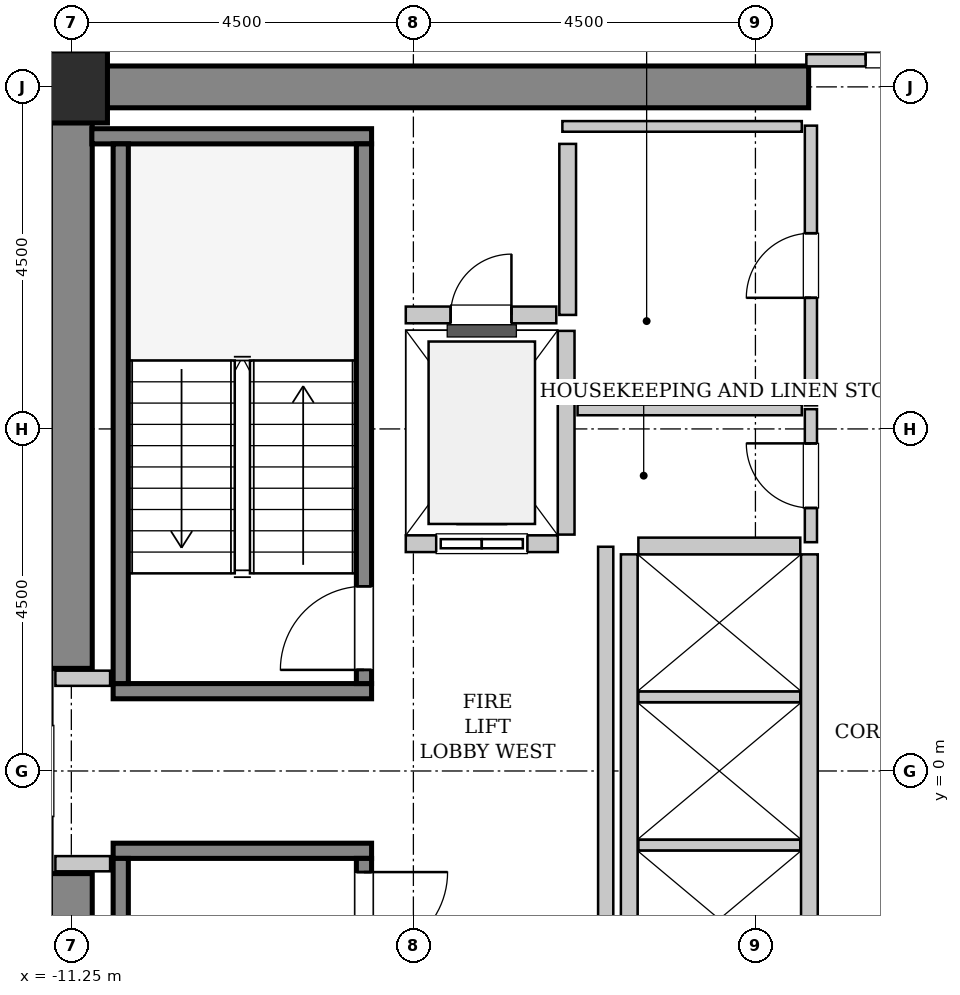
"""IFC4 building model, lengths in metres.
Left out: names, types, materials, properties, quantities, classifications, styles, units other than length and angle.
Written with IfcOpenShell. Run it as: python <this file> out.ifc"""

import sys

from ifc_helpers import new_model, si_unit, direction, frame, frame_2d, origin, origin_2d, place, context, subcontext, project, spatial, rectangle, hollow_rectangle, extrude, source, transform, mapped, element, fill, save


model = new_model("IFC4")
c1 = context("Model", 3, precision=1e-05, world=origin(), true_north=direction((0.0, 1.0)))
c2 = subcontext(c1, "Body", "Model", "MODEL_VIEW")
j1 = project(units=[si_unit("LENGTHUNIT", "METRE"), si_unit("PLANEANGLEUNIT", "RADIAN")], contexts=[c1])
p1 = place(None, origin())
s1 = spatial("IfcSite", under=j1, at=p1, CompositionType="ELEMENT")
p2 = place(p1, origin())
s2 = spatial("IfcBuilding", under=s1, at=p2, CompositionType="ELEMENT")
p3 = place(p2, frame((0.0, 0.0, 183.0)))
s3 = spatial("IfcBuildingStorey", under=s2, at=p3, CompositionType="ELEMENT", Elevation=183.0)
m1 = source(origin(), c2, "Body", "SweptSolid", [
    extrude(rectangle(XDim=9.975, YDim=0.55, at=frame_2d((4.987, 0.0))), origin(), (0.0, 0.0, 1.0), 3.8),
])
p4 = place(p3, frame((-11.525, 9.0, 0.0), z_axis=(0.0, 0.0, 1.0), x_axis=(1.0, 0.0, 0.0)))
e1 = element("IfcWall", 1, at=p4, inside=s3, PredefinedType="SHEAR", context=c2, shape_type="MappedRepresentation", body=[
    mapped(m1, transform((0.0, 0.0, 0.0), x_axis=(1.0, 0.0, 0.0), y_axis=(0.0, 1.0, 0.0), z_axis=(0.0, 0.0, 1.0), scale=1.0)),
])
m2 = source(origin(), c2, "Body", "SweptSolid", [
    extrude(rectangle(XDim=7.375, YDim=0.55, at=frame_2d((3.688, 0.0))), origin(), (0.0, 0.0, 1.0), 3.8),
])
for number, where, z_axis, x_axis in (
    (2, (-11.25, -8.725, 0.0), (0.0, 0.0, 1.0), (0.0, 1.0, 0.0)),
    (3, (-11.25, 1.35, 0.0), (0.0, 0.0, 1.0), (0.0, 1.0, 0.0)),
):
    element("IfcWall", number, at=place(p3, frame(where, z_axis=z_axis, x_axis=x_axis)), inside=s3, PredefinedType="SHEAR", context=c2, shape_type="MappedRepresentation", body=[
        mapped(m2, transform((0.0, 0.0, 0.0), x_axis=(1.0, 0.0, 0.0), y_axis=(0.0, 1.0, 0.0), z_axis=(0.0, 0.0, 1.0), scale=1.0)),
    ])
m3 = source(origin(), c2, "Body", "SweptSolid", [
    extrude(hollow_rectangle(XDim=0.95, YDim=0.95, WallThickness=0.045, InnerFilletRadius=0.045, OuterFilletRadius=0.09, at=origin_2d()), origin(), (0.0, 0.0, 1.0), 3.8),
])
p5 = place(p3, frame((-11.25, 9.0, 0.0), z_axis=(0.0, 0.0, 1.0), x_axis=(1.0, 0.0, 0.0)))
e4 = element("IfcColumn", 4, at=p5, inside=s3, PredefinedType="COLUMN", context=c2, shape_type="MappedRepresentation", body=[
    mapped(m3, transform((0.0, 0.0, 0.0), x_axis=(1.0, 0.0, 0.0), y_axis=(0.0, 1.0, 0.0), z_axis=(0.0, 0.0, 1.0), scale=1.0)),
])
m4 = source(origin(), c2, "Body", "SweptSolid", [
    extrude(rectangle(XDim=3.4, YDim=0.2, at=frame_2d((1.7, 0.0))), origin(), (0.0, 0.0, 1.0), 3.8),
])
p6 = place(p3, frame((-7.3, 1.05, 0.0), z_axis=(0.0, 0.0, 1.0), x_axis=(-1.0, 0.0, 0.0)))
e5 = element("IfcWall", 5, at=p6, inside=s3, PredefinedType="SOLIDWALL", context=c2, shape_type="MappedRepresentation", body=[
    mapped(m4, transform((0.0, 0.0, 0.0), x_axis=(1.0, 0.0, 0.0), y_axis=(0.0, 1.0, 0.0), z_axis=(0.0, 0.0, 1.0), scale=1.0)),
])
m5 = source(origin(), c2, "Body", "SweptSolid", [
    extrude(rectangle(XDim=3.68, YDim=0.2, at=frame_2d((1.84, 0.0))), origin(), (0.0, 0.0, 1.0), 3.8),
])
p7 = place(p3, frame((-7.3, 8.35, 0.0), z_axis=(0.0, 0.0, 1.0), x_axis=(-1.0, 0.0, 0.0)))
e6 = element("IfcWall", 6, at=p7, inside=s3, PredefinedType="SOLIDWALL", context=c2, shape_type="MappedRepresentation", body=[
    mapped(m5, transform((0.0, 0.0, 0.0), x_axis=(1.0, 0.0, 0.0), y_axis=(0.0, 1.0, 0.0), z_axis=(0.0, 0.0, 1.0), scale=1.0)),
])
m6 = source(origin(), c2, "Body", "SweptSolid", [
    extrude(rectangle(XDim=7.1, YDim=0.2, at=frame_2d((3.55, 0.0))), origin(), (0.0, 0.0, 1.0), 3.8),
])
p8 = place(p3, frame((-7.4, 1.15, 0.0), z_axis=(0.0, 0.0, 1.0), x_axis=(0.0, 1.0, 0.0)))
e7 = element("IfcWall", 7, at=p8, inside=s3, PredefinedType="SOLIDWALL", context=c2, shape_type="MappedRepresentation", body=[
    mapped(m6, transform((0.0, 0.0, 0.0), x_axis=(1.0, 0.0, 0.0), y_axis=(0.0, 1.0, 0.0), z_axis=(0.0, 0.0, 1.0), scale=1.0)),
])
p9 = place(p8, frame((0.18, 0.0, 0.0)))
e8 = element("IfcOpeningElement", 8, at=p9, cuts=e7, PredefinedType="OPENING", context=c2, shape_type="SweptSolid", body=[
    extrude(rectangle(XDim=1.1, YDim=2.15, at=frame_2d((0.55, 1.075))), frame((0.0, 0.11, 0.0), z_axis=(0.0, -1.0, 0.0), x_axis=(1.0, 0.0, 0.0)), (0.0, 0.0, 1.0), 0.22),
])
p10 = place(p3, frame((-10.6, 1.15, 0.0), z_axis=(0.0, 0.0, 1.0), x_axis=(0.0, 1.0, 0.0)))
e9 = element("IfcWall", 9, at=p10, inside=s3, PredefinedType="SOLIDWALL", context=c2, shape_type="MappedRepresentation", body=[
    mapped(m6, transform((0.0, 0.0, 0.0), x_axis=(1.0, 0.0, 0.0), y_axis=(0.0, 1.0, 0.0), z_axis=(0.0, 0.0, 1.0), scale=1.0)),
])
p11 = place(p3, frame((-10.7, -1.05, 0.0), z_axis=(0.0, 0.0, 1.0), x_axis=(1.0, 0.0, 0.0)))
e10 = element("IfcWall", 10, at=p11, inside=s3, PredefinedType="SOLIDWALL", context=c2, shape_type="MappedRepresentation", body=[
    mapped(m4, transform((0.0, 0.0, 0.0), x_axis=(1.0, 0.0, 0.0), y_axis=(0.0, 1.0, 0.0), z_axis=(0.0, 0.0, 1.0), scale=1.0)),
])
p12 = place(p3, frame((-10.6, -1.15, 0.0), z_axis=(0.0, 0.0, 1.0), x_axis=(0.0, -1.0, 0.0)))
e11 = element("IfcWall", 11, at=p12, inside=s3, PredefinedType="SOLIDWALL", context=c2, shape_type="MappedRepresentation", body=[
    mapped(m6, transform((0.0, 0.0, 0.0), x_axis=(1.0, 0.0, 0.0), y_axis=(0.0, 1.0, 0.0), z_axis=(0.0, 0.0, 1.0), scale=1.0)),
])
p13 = place(p3, frame((-7.4, -1.15, 0.0), z_axis=(0.0, 0.0, 1.0), x_axis=(0.0, -1.0, 0.0)))
e12 = element("IfcWall", 12, at=p13, inside=s3, PredefinedType="SOLIDWALL", context=c2, shape_type="MappedRepresentation", body=[
    mapped(m6, transform((0.0, 0.0, 0.0), x_axis=(1.0, 0.0, 0.0), y_axis=(0.0, 1.0, 0.0), z_axis=(0.0, 0.0, 1.0), scale=1.0)),
])
p14 = place(p13, frame((0.18, 0.0, 0.0)))
e13 = element("IfcOpeningElement", 13, at=p14, cuts=e12, PredefinedType="OPENING", context=c2, shape_type="SweptSolid", body=[
    extrude(rectangle(XDim=1.1, YDim=2.15, at=frame_2d((0.55, 1.075))), frame((0.0, 0.11, 0.0), z_axis=(0.0, -1.0, 0.0), x_axis=(1.0, 0.0, 0.0)), (0.0, 0.0, 1.0), 0.22),
])
m7 = source(origin(), c2, "Body", "SweptSolid", [
    extrude(rectangle(XDim=2.0, YDim=0.22, at=frame_2d((1.0, 0.0))), origin(), (0.0, 0.0, 1.0), 3.535),
])
p15 = place(p3, frame((-6.85, 2.99, 0.0), z_axis=(0.0, 0.0, 1.0), x_axis=(1.0, 0.0, 0.0)))
e14 = element("IfcWall", 14, at=p15, inside=s3, PredefinedType="SOLIDWALL", context=c2, shape_type="MappedRepresentation", body=[
    mapped(m7, transform((0.0, 0.0, 0.0), x_axis=(1.0, 0.0, 0.0), y_axis=(0.0, 1.0, 0.0), z_axis=(0.0, 0.0, 1.0), scale=1.0)),
])
p16 = place(p15, frame((0.4, 0.0, 0.0)))
e15 = element("IfcOpeningElement", 15, at=p16, cuts=e14, PredefinedType="OPENING", context=c2, shape_type="SweptSolid", body=[
    extrude(rectangle(XDim=1.2, YDim=2.2, at=frame_2d((0.6, 1.1))), frame((0.0, 0.12, 0.0), z_axis=(0.0, -1.0, 0.0), x_axis=(1.0, 0.0, 0.0)), (0.0, 0.0, 1.0), 0.24),
])
m8 = source(origin(), c2, "Body", "SweptSolid", [
    extrude(rectangle(XDim=2.68, YDim=0.22, at=frame_2d((1.34, 0.0))), origin(), (0.0, 0.0, 1.0), 3.535),
])
p17 = place(p3, frame((-4.74, 3.11, 0.0), z_axis=(0.0, 0.0, 1.0), x_axis=(0.0, 1.0, 0.0)))
e16 = element("IfcWall", 16, at=p17, inside=s3, PredefinedType="SOLIDWALL", context=c2, shape_type="MappedRepresentation", body=[
    mapped(m8, transform((0.0, 0.0, 0.0), x_axis=(1.0, 0.0, 0.0), y_axis=(0.0, 1.0, 0.0), z_axis=(0.0, 0.0, 1.0), scale=1.0)),
])
m9 = source(origin(), c2, "Body", "SweptSolid", [
    extrude(rectangle(XDim=5.7, YDim=0.22, at=frame_2d((2.85, 0.0))), origin(), (0.0, 0.0, 1.0), 3.535),
])
for number, where, z_axis, x_axis in (
    (17, (-1.54, -2.85, 0.0), (0.0, 0.0, 1.0), (0.0, 1.0, 0.0)),
    (18, (-3.91, 2.85, 0.0), (0.0, 0.0, 1.0), (0.0, -1.0, 0.0)),
):
    element("IfcWall", number, at=place(p3, frame(where, z_axis=z_axis, x_axis=x_axis)), inside=s3, PredefinedType="SOLIDWALL", context=c2, shape_type="MappedRepresentation", body=[
        mapped(m9, transform((0.0, 0.0, 0.0), x_axis=(1.0, 0.0, 0.0), y_axis=(0.0, 1.0, 0.0), z_axis=(0.0, 0.0, 1.0), scale=1.0)),
    ])
m10 = source(origin(), c2, "Body", "SweptSolid", [
    extrude(rectangle(XDim=2.13, YDim=0.14, at=frame_2d((1.065, 0.0))), origin(), (0.0, 0.0, 1.0), 3.535),
])
for number, where, z_axis, x_axis in (
    (19, (-3.79, -0.975, 0.0), (0.0, 0.0, 1.0), (1.0, 0.0, 0.0)),
    (20, (-3.79, 0.975, 0.0), (0.0, 0.0, 1.0), (1.0, 0.0, 0.0)),
):
    element("IfcWall", number, at=place(p3, frame(where, z_axis=z_axis, x_axis=x_axis)), inside=s3, PredefinedType="PARTITIONING", context=c2, shape_type="MappedRepresentation", body=[
        mapped(m10, transform((0.0, 0.0, 0.0), x_axis=(1.0, 0.0, 0.0), y_axis=(0.0, 1.0, 0.0), z_axis=(0.0, 0.0, 1.0), scale=1.0)),
    ])
m11 = source(origin(), c2, "Body", "SweptSolid", [
    extrude(rectangle(XDim=2.13, YDim=0.22, at=frame_2d((1.065, 0.0))), origin(), (0.0, 0.0, 1.0), 3.535),
])
p18 = place(p3, frame((-1.66, 2.96, 0.0), z_axis=(0.0, 0.0, 1.0), x_axis=(-1.0, 0.0, 0.0)))
e21 = element("IfcWall", 21, at=p18, inside=s3, PredefinedType="SOLIDWALL", context=c2, shape_type="MappedRepresentation", body=[
    mapped(m11, transform((0.0, 0.0, 0.0), x_axis=(1.0, 0.0, 0.0), y_axis=(0.0, 1.0, 0.0), z_axis=(0.0, 0.0, 1.0), scale=1.0)),
])
m12 = source(origin(), c2, "Body", "SweptSolid", [
    extrude(rectangle(XDim=2.25, YDim=0.22, at=frame_2d((1.125, 0.0))), origin(), (0.0, 0.0, 1.0), 3.535),
])
p19 = place(p3, frame((-4.72, 6.0, 0.0), z_axis=(0.0, 0.0, 1.0), x_axis=(0.0, 1.0, 0.0)))
e22 = element("IfcWall", 22, at=p19, inside=s3, PredefinedType="SOLIDWALL", context=c2, shape_type="MappedRepresentation", body=[
    mapped(m12, transform((0.0, 0.0, 0.0), x_axis=(1.0, 0.0, 0.0), y_axis=(0.0, 1.0, 0.0), z_axis=(0.0, 0.0, 1.0), scale=1.0)),
])
m13 = source(origin(), c2, "Body", "SweptSolid", [
    extrude(rectangle(XDim=1.98, YDim=0.22, at=frame_2d((0.99, 0.0))), origin(), (0.0, 0.0, 1.0), 3.535),
])
p20 = place(p3, frame((-6.85, 6.0, 0.0), z_axis=(0.0, 0.0, 1.0), x_axis=(1.0, 0.0, 0.0)))
e23 = element("IfcWall", 23, at=p20, inside=s3, PredefinedType="SOLIDWALL", context=c2, shape_type="MappedRepresentation", body=[
    mapped(m13, transform((0.0, 0.0, 0.0), x_axis=(1.0, 0.0, 0.0), y_axis=(0.0, 1.0, 0.0), z_axis=(0.0, 0.0, 1.0), scale=1.0)),
])
p21 = place(p20, frame((0.59, 0.0, 0.0)))
e24 = element("IfcOpeningElement", 24, at=p21, cuts=e23, PredefinedType="OPENING", context=c2, shape_type="SweptSolid", body=[
    extrude(rectangle(XDim=0.8, YDim=2.0, at=frame_2d((0.4, 1.0))), frame((0.0, 0.12, 0.0), z_axis=(0.0, -1.0, 0.0), x_axis=(1.0, 0.0, 0.0)), (0.0, 0.0, 1.0), 0.24),
])
m14 = source(origin(), c2, "Body", "SweptSolid", [
    extrude(rectangle(XDim=5.9, YDim=0.2, at=frame_2d((2.95, 0.0))), origin(), (0.0, 0.0, 1.0), 3.535),
])
p22 = place(p3, frame((-4.22, -2.95, 0.0), z_axis=(0.0, 0.0, 1.0), x_axis=(0.0, 1.0, 0.0)))
e25 = element("IfcWall", 25, at=p22, inside=s3, PredefinedType="PARTITIONING", context=c2, shape_type="MappedRepresentation", body=[
    mapped(m14, transform((0.0, 0.0, 0.0), x_axis=(1.0, 0.0, 0.0), y_axis=(0.0, 1.0, 0.0), z_axis=(0.0, 0.0, 1.0), scale=1.0)),
])
m15 = source(origin(), c2, "Body", "SweptSolid", [
    extrude(rectangle(XDim=0.72, YDim=0.2, at=frame_2d((0.36, 0.0))), origin(), (0.0, 0.0, 1.0), 3.535),
])
for number, where, z_axis, x_axis in (
    (26, (-11.46, 1.22, 0.0), (0.0, 0.0, 1.0), (1.0, 0.0, 0.0)),
    (27, (-11.46, -1.22, 0.0), (0.0, 0.0, 1.0), (1.0, 0.0, 0.0)),
):
    element("IfcWall", number, at=place(p3, frame(where, z_axis=z_axis, x_axis=x_axis)), inside=s3, PredefinedType="PARTITIONING", context=c2, shape_type="MappedRepresentation", body=[
        mapped(m15, transform((0.0, 0.0, 0.0), x_axis=(1.0, 0.0, 0.0), y_axis=(0.0, 1.0, 0.0), z_axis=(0.0, 0.0, 1.0), scale=1.0)),
    ])
m16 = source(origin(), c2, "Body", "SweptSolid", [
    extrude(rectangle(XDim=3.16, YDim=0.16, at=frame_2d((1.58, 0.0))), origin(), (0.0, 0.0, 1.0), 2.425),
])
p23 = place(p3, frame((-1.58, 9.35, 0.0), z_axis=(0.0, 0.0, 1.0), x_axis=(1.0, 0.0, 0.0)))
e28 = element("IfcWall", 28, at=p23, inside=s3, PredefinedType="PARTITIONING", context=c2, shape_type="MappedRepresentation", body=[
    mapped(m16, transform((0.0, 0.0, 0.0), x_axis=(1.0, 0.0, 0.0), y_axis=(0.0, 1.0, 0.0), z_axis=(0.0, 0.0, 1.0), scale=1.0)),
])
p24 = place(p23, frame((0.78, 0.0, 0.0)))
e29 = element("IfcOpeningElement", 29, at=p24, cuts=e28, PredefinedType="OPENING", context=c2, shape_type="SweptSolid", body=[
    extrude(rectangle(XDim=1.6, YDim=2.3, at=frame_2d((0.8, 1.15))), frame((0.0, 0.09, 0.0), z_axis=(0.0, -1.0, 0.0), x_axis=(1.0, 0.0, 0.0)), (0.0, 0.0, 1.0), 0.18),
])
m17 = source(origin(), c2, "Body", "SweptSolid", [
    extrude(rectangle(XDim=1.75, YDim=0.16, at=frame_2d((0.875, 0.0))), origin(), (0.0, 0.0, 1.0), 3.535),
])
p25 = place(p3, frame((-1.52, 3.01, 0.0), z_axis=(0.0, 0.0, 1.0), x_axis=(0.0, 1.0, 0.0)))
e30 = element("IfcWall", 30, at=p25, inside=s3, PredefinedType="PARTITIONING", context=c2, shape_type="MappedRepresentation", body=[
    mapped(m17, transform((0.0, 0.0, 0.0), x_axis=(1.0, 0.0, 0.0), y_axis=(0.0, 1.0, 0.0), z_axis=(0.0, 0.0, 1.0), scale=1.0)),
])
p26 = place(p25, frame((0.45, 0.0, 0.0)))
e31 = element("IfcOpeningElement", 31, at=p26, cuts=e30, PredefinedType="OPENING", context=c2, shape_type="SweptSolid", body=[
    extrude(rectangle(XDim=0.85, YDim=2.1, at=frame_2d((0.425, 1.05))), frame((0.0, 0.09, 0.0), z_axis=(0.0, -1.0, 0.0), x_axis=(1.0, 0.0, 0.0)), (0.0, 0.0, 1.0), 0.18),
])
m18 = source(origin(), c2, "Body", "SweptSolid", [
    extrude(rectangle(XDim=2.95, YDim=0.14, at=frame_2d((1.475, 0.0))), origin(), (0.0, 0.0, 1.0), 3.535),
])
p27 = place(p3, frame((-4.59, 4.75, 0.0), z_axis=(0.0, 0.0, 1.0), x_axis=(1.0, 0.0, 0.0)))
e32 = element("IfcWall", 32, at=p27, inside=s3, PredefinedType="PARTITIONING", context=c2, shape_type="MappedRepresentation", body=[
    mapped(m18, transform((0.0, 0.0, 0.0), x_axis=(1.0, 0.0, 0.0), y_axis=(0.0, 1.0, 0.0), z_axis=(0.0, 0.0, 1.0), scale=1.0)),
])
m19 = source(origin(), c2, "Body", "SweptSolid", [
    extrude(rectangle(XDim=3.68, YDim=0.16, at=frame_2d((1.84, 0.0))), origin(), (0.0, 0.0, 1.0), 3.535),
])
p28 = place(p3, frame((-1.52, 4.81, 0.0), z_axis=(0.0, 0.0, 1.0), x_axis=(0.0, 1.0, 0.0)))
e33 = element("IfcWall", 33, at=p28, inside=s3, PredefinedType="PARTITIONING", context=c2, shape_type="MappedRepresentation", body=[
    mapped(m19, transform((0.0, 0.0, 0.0), x_axis=(1.0, 0.0, 0.0), y_axis=(0.0, 1.0, 0.0), z_axis=(0.0, 0.0, 1.0), scale=1.0)),
])
p29 = place(p28, frame((1.415, 0.0, 0.0)))
e34 = element("IfcOpeningElement", 34, at=p29, cuts=e33, PredefinedType="OPENING", context=c2, shape_type="SweptSolid", body=[
    extrude(rectangle(XDim=0.85, YDim=2.1, at=frame_2d((0.425, 1.05))), frame((0.0, 0.09, 0.0), z_axis=(0.0, -1.0, 0.0), x_axis=(1.0, 0.0, 0.0)), (0.0, 0.0, 1.0), 0.18),
])
m20 = source(origin(), c2, "Body", "SweptSolid", [
    extrude(rectangle(XDim=3.15, YDim=0.14, at=frame_2d((1.575, 0.0))), origin(), (0.0, 0.0, 1.0), 3.535),
])
p30 = place(p3, frame((-4.79, 8.48, 0.0), z_axis=(0.0, 0.0, 1.0), x_axis=(1.0, 0.0, 0.0)))
e35 = element("IfcWall", 35, at=p30, inside=s3, PredefinedType="PARTITIONING", context=c2, shape_type="MappedRepresentation", body=[
    mapped(m20, transform((0.0, 0.0, 0.0), x_axis=(1.0, 0.0, 0.0), y_axis=(0.0, 1.0, 0.0), z_axis=(0.0, 0.0, 1.0), scale=1.0)),
])
m21 = source(origin(), c2, "Body", "SweptSolid", [
    extrude(rectangle(XDim=1.1, YDim=2.15, at=frame_2d((0.55, 1.075))), frame((0.0, 0.025, 0.0), z_axis=(0.0, -1.0, 0.0), x_axis=(1.0, 0.0, 0.0)), (0.0, 0.0, 1.0), 0.05),
])
p31 = place(p9, origin())
e36 = element("IfcDoor", 36, at=p31, inside=s3, OperationType="SINGLE_SWING_LEFT", PredefinedType="DOOR", context=c2, shape_type="MappedRepresentation", body=[
    mapped(m21, transform((0.0, 0.0, 0.0), x_axis=(1.0, 0.0, 0.0), y_axis=(0.0, 1.0, 0.0), z_axis=(0.0, 0.0, 1.0), scale=1.0)),
])
fill(e8, e36)
p32 = place(p14, origin())
e37 = element("IfcDoor", 37, at=p32, inside=s3, OperationType="SINGLE_SWING_LEFT", PredefinedType="DOOR", context=c2, shape_type="MappedRepresentation", body=[
    mapped(m21, transform((0.0, 0.0, 0.0), x_axis=(1.0, 0.0, 0.0), y_axis=(0.0, 1.0, 0.0), z_axis=(0.0, 0.0, 1.0), scale=1.0)),
])
fill(e13, e37)
m22 = source(origin(), c2, "Body", "SweptSolid", [
    extrude(rectangle(XDim=1.2, YDim=2.2, at=frame_2d((0.6, 1.1))), frame((0.0, 0.025, 0.0), z_axis=(0.0, -1.0, 0.0), x_axis=(1.0, 0.0, 0.0)), (0.0, 0.0, 1.0), 0.05),
])
p33 = place(p16, origin())
e38 = element("IfcDoor", 38, at=p33, inside=s3, OperationType="SLIDING_TO_LEFT", PredefinedType="DOOR", context=c2, shape_type="MappedRepresentation", body=[
    mapped(m22, transform((0.0, 0.0, 0.0), x_axis=(1.0, 0.0, 0.0), y_axis=(0.0, 1.0, 0.0), z_axis=(0.0, 0.0, 1.0), scale=1.0)),
])
fill(e15, e38)
m23 = source(origin(), c2, "Body", "SweptSolid", [
    extrude(rectangle(XDim=0.8, YDim=2.0, at=frame_2d((0.4, 1.0))), frame((0.0, 0.025, 0.0), z_axis=(0.0, -1.0, 0.0), x_axis=(1.0, 0.0, 0.0)), (0.0, 0.0, 1.0), 0.05),
])
p34 = place(p21, origin())
e39 = element("IfcDoor", 39, at=p34, inside=s3, OperationType="SINGLE_SWING_RIGHT", PredefinedType="TRAPDOOR", context=c2, shape_type="MappedRepresentation", body=[
    mapped(m23, transform((0.0, 0.0, 0.0), x_axis=(1.0, 0.0, 0.0), y_axis=(0.0, 1.0, 0.0), z_axis=(0.0, 0.0, 1.0), scale=1.0)),
])
fill(e24, e39)
m24 = source(origin(), c2, "Body", "SweptSolid", [
    extrude(rectangle(XDim=1.6, YDim=2.3, at=frame_2d((0.8, 1.15))), frame((0.0, 0.025, 0.0), z_axis=(0.0, -1.0, 0.0), x_axis=(1.0, 0.0, 0.0)), (0.0, 0.0, 1.0), 0.05),
])
p35 = place(p24, origin())
e40 = element("IfcDoor", 40, at=p35, inside=s3, OperationType="DOUBLE_DOOR_SINGLE_SWING", PredefinedType="DOOR", context=c2, shape_type="MappedRepresentation", body=[
    mapped(m24, transform((0.0, 0.0, 0.0), x_axis=(1.0, 0.0, 0.0), y_axis=(0.0, 1.0, 0.0), z_axis=(0.0, 0.0, 1.0), scale=1.0)),
])
fill(e29, e40)
m25 = source(origin(), c2, "Body", "SweptSolid", [
    extrude(rectangle(XDim=0.85, YDim=2.1, at=frame_2d((0.425, 1.05))), frame((0.0, 0.025, 0.0), z_axis=(0.0, -1.0, 0.0), x_axis=(1.0, 0.0, 0.0)), (0.0, 0.0, 1.0), 0.05),
])
p36 = place(p26, origin())
e41 = element("IfcDoor", 41, at=p36, inside=s3, OperationType="SINGLE_SWING_RIGHT", PredefinedType="DOOR", context=c2, shape_type="MappedRepresentation", body=[
    mapped(m25, transform((0.0, 0.0, 0.0), x_axis=(1.0, 0.0, 0.0), y_axis=(0.0, 1.0, 0.0), z_axis=(0.0, 0.0, 1.0), scale=1.0)),
])
fill(e31, e41)
p37 = place(p29, origin())
e42 = element("IfcDoor", 42, at=p37, inside=s3, OperationType="SINGLE_SWING_LEFT", PredefinedType="DOOR", context=c2, shape_type="MappedRepresentation", body=[
    mapped(m25, transform((0.0, 0.0, 0.0), x_axis=(1.0, 0.0, 0.0), y_axis=(0.0, 1.0, 0.0), z_axis=(0.0, 0.0, 1.0), scale=1.0)),
])
fill(e34, e42)
save(model, sys.argv[1])
